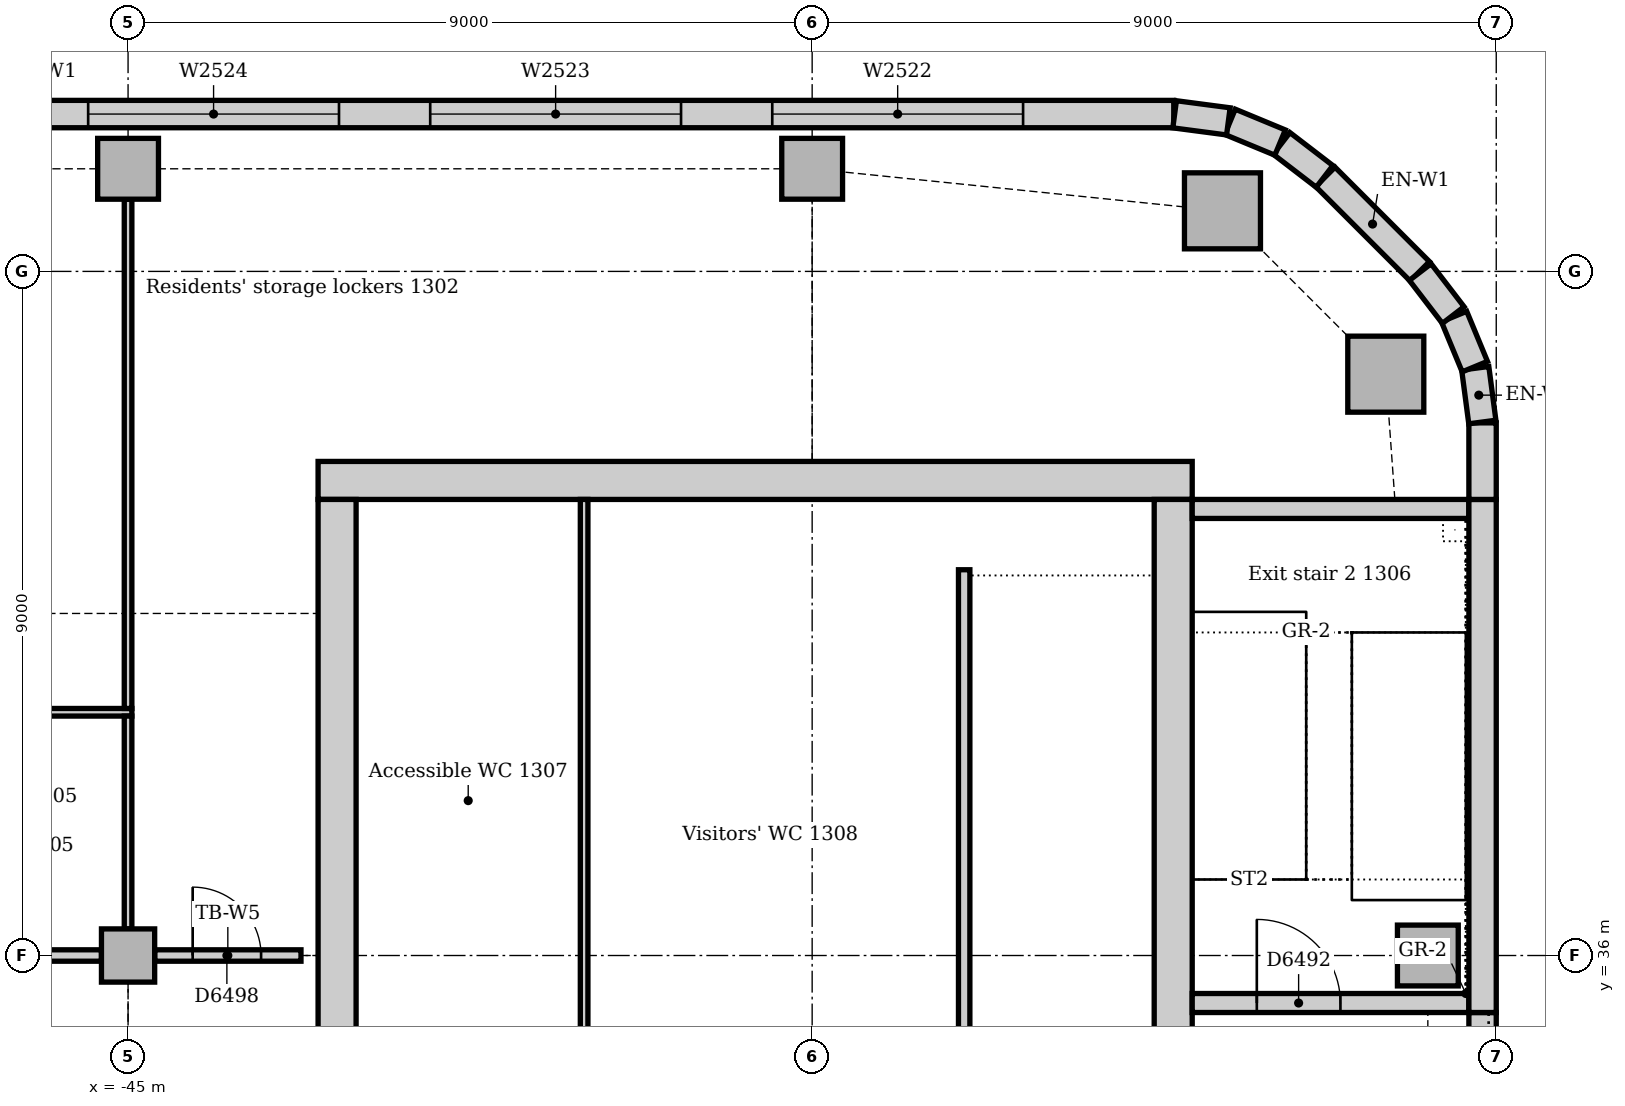
"""IFC4 building model, lengths in metres.
Left out: names, types, materials, properties, quantities, classifications, styles, units other than length and angle.
Written with IfcOpenShell. Run it as: python <this file> out.ifc"""

import sys

from ifc_helpers import new_model, si_unit, direction, frame, frame_2d, origin, origin_2d, place, context, subcontext, project, spatial, rectangle, extrude, element, fill, save


model = new_model("IFC4")
c1 = context("Model", 3, precision=1e-05, world=origin(), true_north=direction((0.0, 1.0)))
c2 = subcontext(c1, "Body", "Model", "MODEL_VIEW")
j1 = project(units=[si_unit("LENGTHUNIT", "METRE"), si_unit("PLANEANGLEUNIT", "RADIAN")], contexts=[c1])
p1 = place(None, origin())
s1 = spatial("IfcSite", under=j1, at=p1, CompositionType="ELEMENT")
p2 = place(p1, origin())
s2 = spatial("IfcBuilding", under=s1, at=p2, CompositionType="ELEMENT")
p3 = place(p2, frame((0.0, 0.0, 59.0)))
s3 = spatial("IfcBuildingStorey", under=s2, at=p3, CompositionType="ELEMENT", Elevation=59.0)
p4 = place(p3, frame((-31.0, 42.25, 0.0), z_axis=(0.0, 0.0, 1.0), x_axis=(-1.0, 0.0, 0.0)))
e1 = element("IfcWall", 1, at=p4, inside=s3, PredefinedType="SOLIDWALL", context=c2, shape_type="SweptSolid", body=[
    extrude(rectangle(XDim=11.5, YDim=0.5, at=frame_2d((5.75, 0.0))), origin(), (0.0, 0.0, 1.0), 4.0),
])
p5 = place(p3, frame((-31.25, 30.5, 0.0), z_axis=(0.0, 0.0, 1.0), x_axis=(0.0, 1.0, 0.0)))
e2 = element("IfcWall", 2, at=p5, inside=s3, PredefinedType="SOLIDWALL", context=c2, shape_type="SweptSolid", body=[
    extrude(rectangle(XDim=11.5, YDim=0.5, at=frame_2d((5.75, 0.0))), origin(), (0.0, 0.0, 1.0), 4.0),
])
p6 = place(p5, frame((0.85, 0.0, 0.0)))
e3 = element("IfcOpeningElement", 3, at=p6, cuts=e2, PredefinedType="OPENING", context=c2, shape_type="SweptSolid", body=[
    extrude(rectangle(XDim=1.8, YDim=2.1, at=frame_2d((0.9, 1.05))), frame((0.0, 0.26, 0.0), z_axis=(0.0, -1.0, 0.0), x_axis=(1.0, 0.0, 0.0)), (0.0, 0.0, 1.0), 0.52),
])
p7 = place(p3, frame((-42.25, 42.0, 0.0), z_axis=(0.0, 0.0, 1.0), x_axis=(0.0, -1.0, 0.0)))
e4 = element("IfcWall", 4, at=p7, inside=s3, PredefinedType="SOLIDWALL", context=c2, shape_type="SweptSolid", body=[
    extrude(rectangle(XDim=11.5, YDim=0.5, at=frame_2d((5.75, 0.0))), origin(), (0.0, 0.0, 1.0), 4.0),
])
p8 = place(p7, frame((8.85, 0.0, 0.0)))
e5 = element("IfcOpeningElement", 5, at=p8, cuts=e4, PredefinedType="OPENING", context=c2, shape_type="SweptSolid", body=[
    extrude(rectangle(XDim=1.8, YDim=2.1, at=frame_2d((0.9, 1.05))), frame((0.0, 0.26, 0.0), z_axis=(0.0, -1.0, 0.0), x_axis=(1.0, 0.0, 0.0)), (0.0, 0.0, 1.0), 0.52),
])
p9 = place(p3, frame((-31.0, 35.375, 0.0), z_axis=(0.0, 0.0, 1.0), x_axis=(1.0, 0.0, 0.0)))
e6 = element("IfcWall", 6, at=p9, inside=s3, PredefinedType="SOLIDWALL", context=c2, shape_type="SweptSolid", body=[
    extrude(rectangle(XDim=3.64, YDim=0.25, at=frame_2d((1.82, 0.0))), origin(), (0.0, 0.0, 1.0), 4.0),
])
p10 = place(p9, frame((0.85, 0.0, 0.0)))
e7 = element("IfcOpeningElement", 7, at=p10, cuts=e6, PredefinedType="OPENING", context=c2, shape_type="SweptSolid", body=[
    extrude(rectangle(XDim=1.1, YDim=2.1, at=frame_2d((0.55, 1.05))), frame((0.0, 0.135, 0.0), z_axis=(0.0, -1.0, 0.0), x_axis=(1.0, 0.0, 0.0)), (0.0, 0.0, 1.0), 0.27),
])
p11 = place(p3, frame((-27.36, 41.875, 0.0), z_axis=(0.0, 0.0, 1.0), x_axis=(-1.0, 0.0, 0.0)))
e8 = element("IfcWall", 8, at=p11, inside=s3, PredefinedType="SOLIDWALL", context=c2, shape_type="SweptSolid", body=[
    extrude(rectangle(XDim=3.64, YDim=0.25, at=frame_2d((1.82, 0.0))), origin(), (0.0, 0.0, 1.0), 4.0),
])
for number, where, z_axis, x_axis in (
    (9, (-28.453, 43.648, 0.0), (0.0, 0.0, 1.0), (1.0, 0.0, 0.0)),
    (10, (-30.602, 45.797, 0.0), (0.0, 0.0, 1.0), (1.0, 0.0, 0.0)),
):
    element("IfcColumn", number, at=place(p3, frame(where, z_axis=z_axis, x_axis=x_axis)), inside=s3, PredefinedType="COLUMN", context=c2, shape_type="SweptSolid", body=[
        extrude(rectangle(XDim=1.0, YDim=1.0, at=origin_2d()), origin(), (0.0, 0.0, 1.0), 3.85),
    ])
p12 = place(p3, frame((-27.9, 36.0, 0.0), z_axis=(0.0, 0.0, 1.0), x_axis=(1.0, 0.0, 0.0)))
e11 = element("IfcColumn", 11, at=p12, inside=s3, PredefinedType="COLUMN", context=c2, shape_type="SweptSolid", body=[
    extrude(rectangle(XDim=0.8, YDim=0.8, at=origin_2d()), origin(), (0.0, 0.0, 1.0), 4.0),
])
for number, where, z_axis, x_axis in (
    (12, (-45.0, 46.35, 0.0), (0.0, 0.0, 1.0), (1.0, 0.0, 0.0)),
    (13, (-36.0, 46.35, 0.0), (0.0, 0.0, 1.0), (1.0, 0.0, 0.0)),
):
    element("IfcColumn", number, at=place(p3, frame(where, z_axis=z_axis, x_axis=x_axis)), inside=s3, PredefinedType="COLUMN", context=c2, shape_type="SweptSolid", body=[
        extrude(rectangle(XDim=0.8, YDim=0.8, at=origin_2d()), origin(), (0.0, 0.0, 1.0), 3.85),
    ])
p13 = place(p3, frame((-45.0, 36.0, 0.0), z_axis=(0.0, 0.0, 1.0), x_axis=(1.0, 0.0, 0.0)))
e14 = element("IfcColumn", 14, at=p13, inside=s3, PredefinedType="COLUMN", context=c2, shape_type="SweptSolid", body=[
    extrude(rectangle(XDim=0.7, YDim=0.7, at=origin_2d()), origin(), (0.0, 0.0, 1.0), 3.85),
])
p14 = place(p3, frame((-27.18, 27.75, 0.0), z_axis=(0.0, 0.0, 1.0), x_axis=(0.0, 1.0, 0.0)))
e15 = element("IfcWall", 15, at=p14, inside=s3, PredefinedType="STANDARD", context=c2, shape_type="SweptSolid", body=[
    extrude(rectangle(XDim=7.5, YDim=0.36, at=frame_2d((3.75, 0.0))), origin(), (0.0, 0.0, 1.0), 3.85),
])
p15 = place(p14, frame((2.85, 0.0, 1.2)))
e16 = element("IfcOpeningElement", 16, at=p15, cuts=e15, PredefinedType="OPENING", context=c2, shape_type="SweptSolid", body=[
    extrude(rectangle(XDim=1.8, YDim=1.2, at=frame_2d((0.9, 0.6))), frame((0.0, 0.19, 0.0), z_axis=(0.0, -1.0, 0.0), x_axis=(1.0, 0.0, 0.0)), (0.0, 0.0, 1.0), 0.38),
])
p16 = place(p3, frame((-27.18, 35.25, 0.0), z_axis=(0.0, 0.0, 1.0), x_axis=(0.0, 1.0, 0.0)))
e17 = element("IfcWall", 17, at=p16, inside=s3, PredefinedType="STANDARD", context=c2, shape_type="SweptSolid", body=[
    extrude(rectangle(XDim=6.75, YDim=0.36, at=frame_2d((3.375, 0.0))), origin(), (0.0, 0.0, 1.0), 3.85),
])
p17 = place(p3, frame((-27.18, 42.0, 0.0), z_axis=(0.0, 0.0, 1.0), x_axis=(0.0, 1.0, 0.0)))
e18 = element("IfcWall", 18, at=p17, inside=s3, PredefinedType="STANDARD", context=c2, shape_type="SweptSolid", body=[
    extrude(rectangle(XDim=1.007, YDim=0.36, at=frame_2d((0.504, 0.0))), origin(), (0.0, 0.0, 1.0), 3.85),
])
p18 = place(p3, frame((-28.006, 45.001, 0.0), z_axis=(0.0, 0.0, 1.0), x_axis=(-0.707106781187, 0.707106781187, 0.0)))
e19 = element("IfcWall", 19, at=p18, inside=s3, PredefinedType="STANDARD", context=c2, shape_type="SweptSolid", body=[
    extrude(rectangle(XDim=1.757, YDim=0.36, at=frame_2d((0.879, 0.0))), origin(), (0.0, 0.0, 1.0), 3.85),
])
p19 = place(p3, frame((-31.243, 47.07, 0.0), z_axis=(0.0, 0.0, 1.0), x_axis=(-1.0, 0.0, 0.0)))
e20 = element("IfcWall", 20, at=p19, inside=s3, PredefinedType="STANDARD", context=c2, shape_type="SweptSolid", body=[
    extrude(rectangle(XDim=29.765, YDim=0.36, at=frame_2d((14.882, 0.0))), origin(), (0.0, 0.0, 1.0), 3.85),
])
p20 = place(p19, frame((1.982, 0.0, 0.9)))
e21 = element("IfcOpeningElement", 21, at=p20, cuts=e20, PredefinedType="OPENING", context=c2, shape_type="SweptSolid", body=[
    extrude(rectangle(XDim=3.3, YDim=1.6, at=frame_2d((1.65, 0.8))), frame((0.0, 0.19, 0.0), z_axis=(0.0, -1.0, 0.0), x_axis=(1.0, 0.0, 0.0)), (0.0, 0.0, 1.0), 0.38),
])
p21 = place(p19, frame((6.482, 0.0, 0.9)))
e22 = element("IfcOpeningElement", 22, at=p21, cuts=e20, PredefinedType="OPENING", context=c2, shape_type="SweptSolid", body=[
    extrude(rectangle(XDim=3.3, YDim=1.6, at=frame_2d((1.65, 0.8))), frame((0.0, 0.19, 0.0), z_axis=(0.0, -1.0, 0.0), x_axis=(1.0, 0.0, 0.0)), (0.0, 0.0, 1.0), 0.38),
])
p22 = place(p19, frame((10.982, 0.0, 0.9)))
e23 = element("IfcOpeningElement", 23, at=p22, cuts=e20, PredefinedType="OPENING", context=c2, shape_type="SweptSolid", body=[
    extrude(rectangle(XDim=3.3, YDim=1.6, at=frame_2d((1.65, 0.8))), frame((0.0, 0.19, 0.0), z_axis=(0.0, -1.0, 0.0), x_axis=(1.0, 0.0, 0.0)), (0.0, 0.0, 1.0), 0.38),
])
p23 = place(p19, frame((15.482, 0.0, 0.9)))
e24 = element("IfcOpeningElement", 24, at=p23, cuts=e20, PredefinedType="OPENING", context=c2, shape_type="SweptSolid", body=[
    extrude(rectangle(XDim=3.3, YDim=1.6, at=frame_2d((1.65, 0.8))), frame((0.0, 0.19, 0.0), z_axis=(0.0, -1.0, 0.0), x_axis=(1.0, 0.0, 0.0)), (0.0, 0.0, 1.0), 0.38),
])
p24 = place(p19, frame((19.982, 0.0, 0.9)))
e25 = element("IfcOpeningElement", 25, at=p24, cuts=e20, PredefinedType="OPENING", context=c2, shape_type="SweptSolid", body=[
    extrude(rectangle(XDim=3.3, YDim=1.6, at=frame_2d((1.65, 0.8))), frame((0.0, 0.19, 0.0), z_axis=(0.0, -1.0, 0.0), x_axis=(1.0, 0.0, 0.0)), (0.0, 0.0, 1.0), 0.38),
])
p25 = place(p19, frame((24.482, 0.0, 0.9)))
e26 = element("IfcOpeningElement", 26, at=p25, cuts=e20, PredefinedType="OPENING", context=c2, shape_type="SweptSolid", body=[
    extrude(rectangle(XDim=3.3, YDim=1.6, at=frame_2d((1.65, 0.8))), frame((0.0, 0.19, 0.0), z_axis=(0.0, -1.0, 0.0), x_axis=(1.0, 0.0, 0.0)), (0.0, 0.0, 1.0), 0.38),
])
for number, where, z_axis, x_axis in (
    (27, (-27.183, 43.019, 0.0), (0.0, 0.0, 1.0), (-0.131, 0.991, 0.0)),
    (28, (-27.282, 43.747, 0.0), (0.0, 0.0, 1.0), (-0.383, 0.924, 0.0)),
):
    element("IfcWall", number, at=place(p3, frame(where, z_axis=z_axis, x_axis=x_axis)), inside=s3, PredefinedType="STANDARD", context=c2, shape_type="SweptSolid", body=[
        extrude(rectangle(XDim=0.713, YDim=0.36, at=frame_2d((0.356, 0.0))), origin(), (0.0, 0.0, 1.0), 3.85),
    ])
for number, where, z_axis, x_axis in (
    (29, (-27.566, 44.425, 0.0), (0.0, 0.0, 1.0), (-0.609, 0.793, 0.0)),
    (30, (-29.259, 46.25, 0.0), (0.0, 0.0, 1.0), (-0.793, 0.609, 0.0)),
):
    element("IfcWall", number, at=place(p3, frame(where, z_axis=z_axis, x_axis=x_axis)), inside=s3, PredefinedType="STANDARD", context=c2, shape_type="SweptSolid", body=[
        extrude(rectangle(XDim=0.713, YDim=0.36, at=frame_2d((0.357, 0.0))), origin(), (0.0, 0.0, 1.0), 3.85),
    ])
for number, where, z_axis, x_axis in (
    (31, (-29.844, 46.695, 0.0), (0.0, 0.0, 1.0), (-0.924, 0.383, 0.0)),
    (32, (-30.524, 46.974, 0.0), (0.0, 0.0, 1.0), (-0.991, 0.131, 0.0)),
):
    element("IfcWall", number, at=place(p3, frame(where, z_axis=z_axis, x_axis=x_axis)), inside=s3, PredefinedType="STANDARD", context=c2, shape_type="SweptSolid", body=[
        extrude(rectangle(XDim=0.713, YDim=0.36, at=frame_2d((0.356, 0.0))), origin(), (0.0, 0.0, 1.0), 3.85),
    ])
p26 = place(p3, frame((-34.0, 41.075, 0.0), z_axis=(0.0, 0.0, 1.0), x_axis=(0.0, -1.0, 0.0)))
e33 = element("IfcWall", 33, at=p26, inside=s3, PredefinedType="SOLIDWALL", context=c2, shape_type="SweptSolid", body=[
    extrude(rectangle(XDim=7.0, YDim=0.15, at=frame_2d((3.5, 0.0))), origin(), (0.0, 0.0, 1.0), 4.0),
])
p27 = place(p3, frame((-39.0, 34.075, 0.0), z_axis=(0.0, 0.0, 1.0), x_axis=(0.0, 1.0, 0.0)))
e34 = element("IfcWall", 34, at=p27, inside=s3, PredefinedType="PARTITIONING", context=c2, shape_type="SweptSolid", body=[
    extrude(rectangle(XDim=7.925, YDim=0.1, at=frame_2d((3.962, 0.0))), origin(), (0.0, 0.0, 1.0), 3.85),
])
p28 = place(p3, frame((-44.65, 36.0, 0.0), z_axis=(0.0, 0.0, 1.0), x_axis=(1.0, 0.0, 0.0)))
e35 = element("IfcWall", 35, at=p28, inside=s3, PredefinedType="PARTITIONING", context=c2, shape_type="SweptSolid", body=[
    extrude(rectangle(XDim=1.925, YDim=0.15, at=frame_2d((0.963, 0.0))), origin(), (0.0, 0.0, 1.0), 3.602),
])
p29 = place(p28, frame((0.5, 0.0, 0.0)))
e36 = element("IfcOpeningElement", 36, at=p29, cuts=e35, PredefinedType="OPENING", context=c2, shape_type="SweptSolid", body=[
    extrude(rectangle(XDim=0.9, YDim=2.1, at=frame_2d((0.45, 1.05))), frame((0.0, 0.085, 0.0), z_axis=(0.0, -1.0, 0.0), x_axis=(1.0, 0.0, 0.0)), (0.0, 0.0, 1.0), 0.17),
])
p30 = place(p3, frame((-53.65, 36.0, 0.0), z_axis=(0.0, 0.0, 1.0), x_axis=(1.0, 0.0, 0.0)))
e37 = element("IfcWall", 37, at=p30, inside=s3, PredefinedType="PARTITIONING", context=c2, shape_type="SweptSolid", body=[
    extrude(rectangle(XDim=8.3, YDim=0.15, at=frame_2d((4.15, 0.0))), origin(), (0.0, 0.0, 1.0), 3.158),
])
p31 = place(p30, frame((2.94, 0.0, 0.0)))
e38 = element("IfcOpeningElement", 38, at=p31, cuts=e37, PredefinedType="OPENING", context=c2, shape_type="SweptSolid", body=[
    extrude(rectangle(XDim=1.0, YDim=2.1, at=frame_2d((0.5, 1.05))), frame((0.0, 0.085, 0.0), z_axis=(0.0, -1.0, 0.0), x_axis=(1.0, 0.0, 0.0)), (0.0, 0.0, 1.0), 0.17),
])
p32 = place(p3, frame((-53.925, 39.2, 0.0), z_axis=(0.0, 0.0, 1.0), x_axis=(1.0, 0.0, 0.0)))
e39 = element("IfcWall", 39, at=p32, inside=s3, PredefinedType="PARTITIONING", context=c2, shape_type="SweptSolid", body=[
    extrude(rectangle(XDim=8.975, YDim=0.1, at=frame_2d((4.487, 0.0))), origin(), (0.0, 0.0, 1.0), 3.85),
])
p33 = place(p32, frame((3.265, 0.0, 0.0)))
e40 = element("IfcOpeningElement", 40, at=p33, cuts=e39, PredefinedType="OPENING", context=c2, shape_type="SweptSolid", body=[
    extrude(rectangle(XDim=0.9, YDim=2.1, at=frame_2d((0.45, 1.05))), frame((0.0, 0.06, 0.0), z_axis=(0.0, -1.0, 0.0), x_axis=(1.0, 0.0, 0.0)), (0.0, 0.0, 1.0), 0.12),
])
p34 = place(p3, frame((-45.0, 39.25, 0.0), z_axis=(0.0, 0.0, 1.0), x_axis=(0.0, 1.0, 0.0)))
e41 = element("IfcWall", 41, at=p34, inside=s3, PredefinedType="PARTITIONING", context=c2, shape_type="SweptSolid", body=[
    extrude(rectangle(XDim=6.7, YDim=0.1, at=frame_2d((3.35, 0.0))), origin(), (0.0, 0.0, 1.0), 3.256),
])
p35 = place(p3, frame((-45.0, 36.35, 0.0), z_axis=(0.0, 0.0, 1.0), x_axis=(0.0, 1.0, 0.0)))
e42 = element("IfcWall", 42, at=p35, inside=s3, PredefinedType="PARTITIONING", context=c2, shape_type="SweptSolid", body=[
    extrude(rectangle(XDim=2.8, YDim=0.1, at=frame_2d((1.4, 0.0))), origin(), (0.0, 0.0, 1.0), 3.256),
])
p36 = place(p20, origin())
e43 = element("IfcWindow", 43, at=p36, inside=s3, PartitioningType="SINGLE_PANEL", PredefinedType="WINDOW", context=c2, shape_type="SweptSolid", body=[
    extrude(rectangle(XDim=3.3, YDim=1.6, at=frame_2d((1.65, 0.8))), frame((0.0, 0.13, 0.0), z_axis=(0.0, -1.0, 0.0), x_axis=(1.0, 0.0, 0.0)), (0.0, 0.0, 1.0), 0.06),
])
fill(e21, e43)
p37 = place(p21, origin())
e44 = element("IfcWindow", 44, at=p37, inside=s3, PartitioningType="SINGLE_PANEL", PredefinedType="WINDOW", context=c2, shape_type="SweptSolid", body=[
    extrude(rectangle(XDim=3.3, YDim=1.6, at=frame_2d((1.65, 0.8))), frame((0.0, 0.13, 0.0), z_axis=(0.0, -1.0, 0.0), x_axis=(1.0, 0.0, 0.0)), (0.0, 0.0, 1.0), 0.06),
])
fill(e22, e44)
p38 = place(p22, origin())
e45 = element("IfcWindow", 45, at=p38, inside=s3, PartitioningType="SINGLE_PANEL", PredefinedType="WINDOW", context=c2, shape_type="SweptSolid", body=[
    extrude(rectangle(XDim=3.3, YDim=1.6, at=frame_2d((1.65, 0.8))), frame((0.0, 0.13, 0.0), z_axis=(0.0, -1.0, 0.0), x_axis=(1.0, 0.0, 0.0)), (0.0, 0.0, 1.0), 0.06),
])
fill(e23, e45)
p39 = place(p10, origin())
e46 = element("IfcDoor", 46, at=p39, inside=s3, OperationType="SINGLE_SWING_LEFT", PredefinedType="DOOR", context=c2, shape_type="SweptSolid", body=[
    extrude(rectangle(XDim=1.1, YDim=2.1, at=frame_2d((0.55, 1.05))), frame((0.0, 0.025, 0.0), z_axis=(0.0, -1.0, 0.0), x_axis=(1.0, 0.0, 0.0)), (0.0, 0.0, 1.0), 0.05),
])
fill(e7, e46)
p40 = place(p29, origin())
e47 = element("IfcDoor", 47, at=p40, inside=s3, OperationType="SINGLE_SWING_LEFT", PredefinedType="DOOR", context=c2, shape_type="SweptSolid", body=[
    extrude(rectangle(XDim=0.9, YDim=2.1, at=frame_2d((0.45, 1.05))), frame((0.0, 0.025, 0.0), z_axis=(0.0, -1.0, 0.0), x_axis=(1.0, 0.0, 0.0)), (0.0, 0.0, 1.0), 0.05),
])
fill(e36, e47)
save(model, sys.argv[1])
